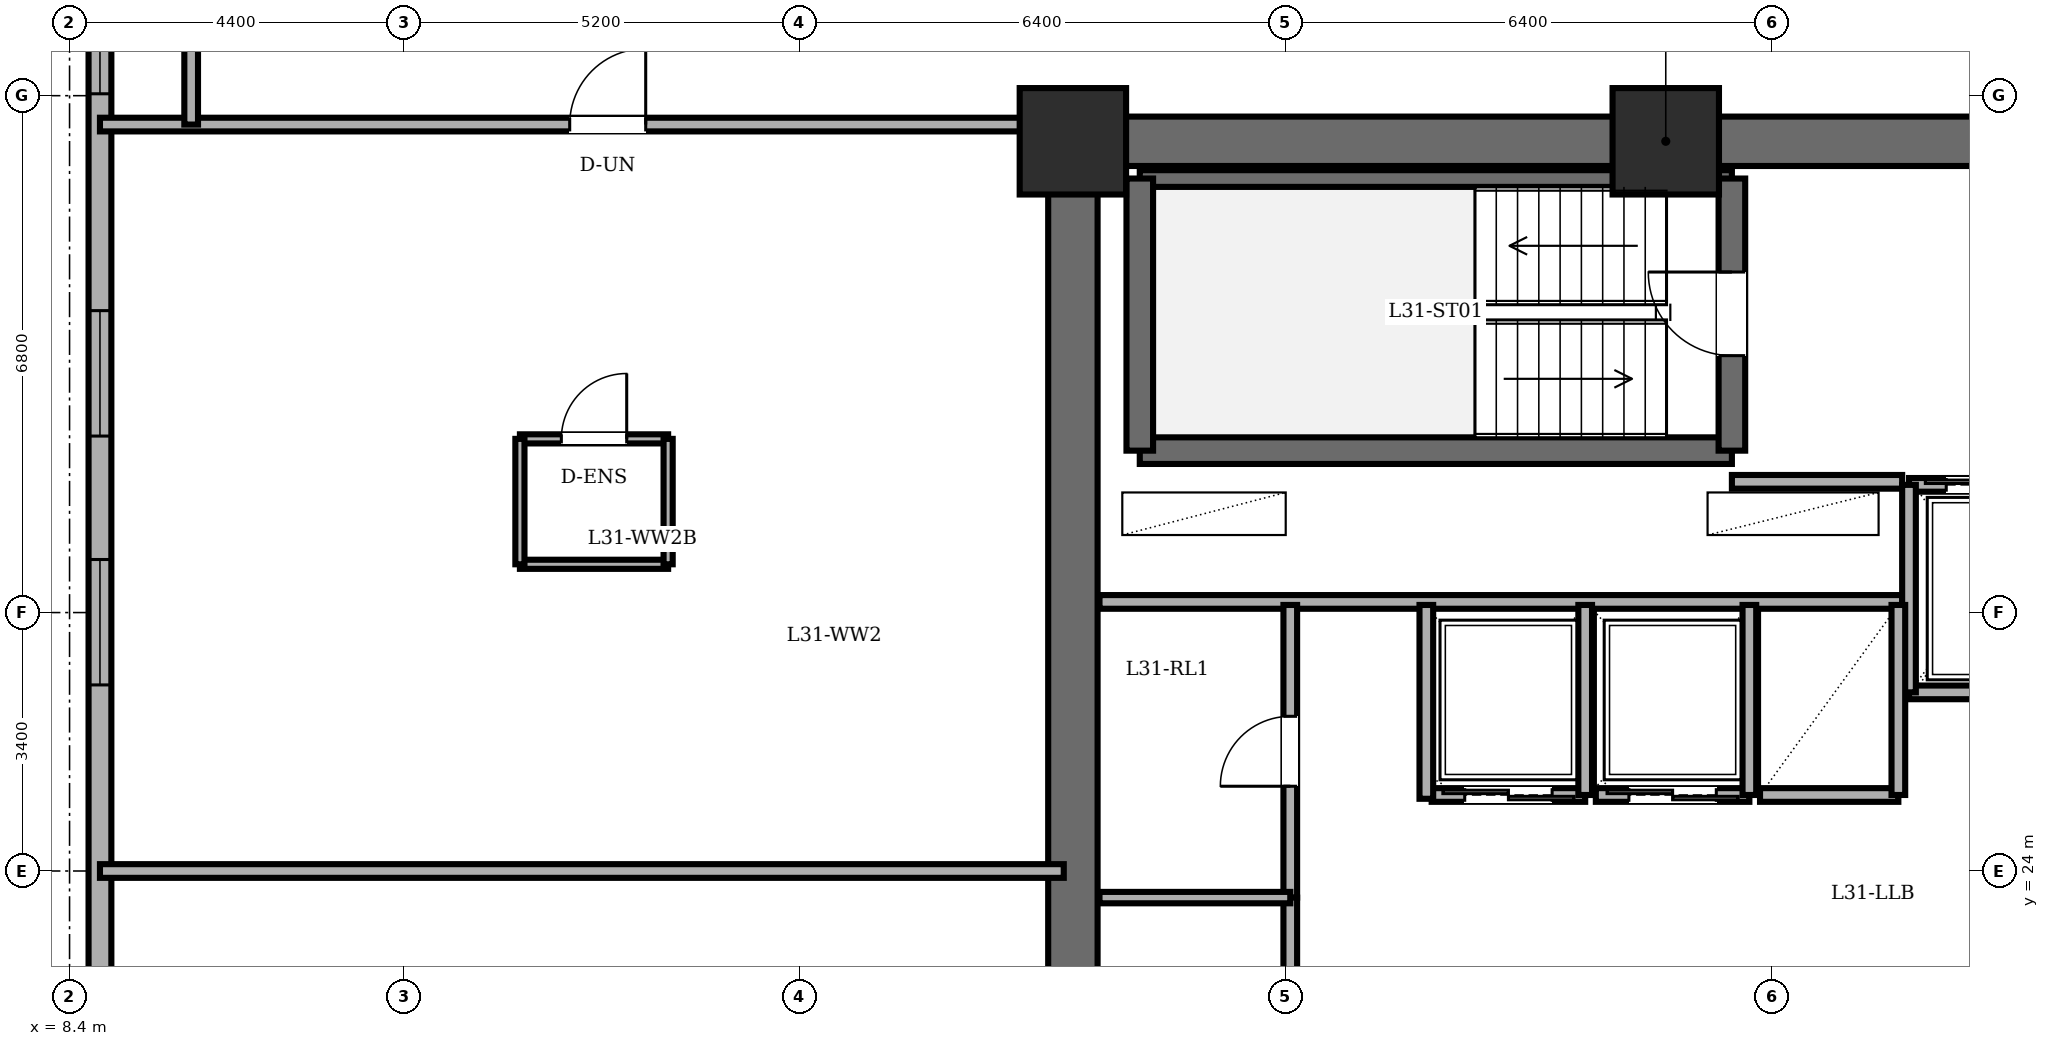
"""IFC4 building model, lengths in metres.
Left out: names, types, materials, properties, quantities, classifications, styles, units other than length and angle.
Written with IfcOpenShell. Run it as: python <this file> out.ifc"""

import sys

from ifc_helpers import new_model, si_unit, direction, frame, frame_2d, origin, origin_2d, place, context, subcontext, project, spatial, rectangle, extrude, element, fill, save


model = new_model("IFC4")
c1 = context("Model", 3, precision=1e-05, world=origin(), true_north=direction((0.0, 1.0)))
c2 = subcontext(c1, "Body", "Model", "MODEL_VIEW")
j1 = project(units=[si_unit("LENGTHUNIT", "METRE"), si_unit("PLANEANGLEUNIT", "RADIAN")], contexts=[c1])
p1 = place(None, origin())
s1 = spatial("IfcSite", under=j1, at=p1, CompositionType="ELEMENT")
p2 = place(p1, origin())
s2 = spatial("IfcBuilding", under=s1, at=p2, CompositionType="ELEMENT")
p3 = place(p2, frame((0.0, 0.0, 118.7)))
s3 = spatial("IfcBuildingStorey", under=s2, at=p3, CompositionType="ELEMENT", Elevation=118.7)
for number, where, z_axis, x_axis in (
    (1, (29.4, 33.6, 0.0), (0.0, 0.0, 1.0), (1.0, 0.0, 0.0)),
    (2, (21.6, 33.6, 0.0), (0.0, 0.0, 1.0), (1.0, 0.0, 0.0)),
):
    element("IfcColumn", number, at=place(p3, frame(where, z_axis=z_axis, x_axis=x_axis)), inside=s3, PredefinedType="COLUMN", context=c2, shape_type="SweptSolid", body=[
        extrude(rectangle(XDim=1.4, YDim=1.4, at=origin_2d()), origin(), (0.0, 0.0, 1.0), 3.6),
    ])
p4 = place(p3, frame((8.8, 38.2, 0.0), z_axis=(0.0, 0.0, 1.0), x_axis=(0.0, -1.0, 0.0)))
e3 = element("IfcWall", 3, at=p4, inside=s3, PredefinedType="SOLIDWALL", context=c2, shape_type="SweptSolid", body=[
    extrude(rectangle(XDim=28.4, YDim=0.3, at=frame_2d((14.2, 0.0))), origin(), (0.0, 0.0, 1.0), 3.4),
])
p5 = place(p4, frame((2.325, 0.0, 0.85)))
e4 = element("IfcOpeningElement", 4, at=p5, cuts=e3, PredefinedType="OPENING", context=c2, shape_type="SweptSolid", body=[
    extrude(rectangle(XDim=1.65, YDim=1.55, at=frame_2d((0.825, 0.775))), frame((0.0, 0.16, 0.0), z_axis=(0.0, -1.0, 0.0), x_axis=(1.0, 0.0, 0.0)), (0.0, 0.0, 1.0), 0.32),
])
p6 = place(p4, frame((6.828, 0.0, 0.85)))
e5 = element("IfcOpeningElement", 5, at=p6, cuts=e3, PredefinedType="OPENING", context=c2, shape_type="SweptSolid", body=[
    extrude(rectangle(XDim=1.65, YDim=1.55, at=frame_2d((0.825, 0.775))), frame((0.0, 0.16, 0.0), z_axis=(0.0, -1.0, 0.0), x_axis=(1.0, 0.0, 0.0)), (0.0, 0.0, 1.0), 0.32),
])
p7 = place(p4, frame((10.102, 0.0, 0.85)))
e6 = element("IfcOpeningElement", 6, at=p7, cuts=e3, PredefinedType="OPENING", context=c2, shape_type="SweptSolid", body=[
    extrude(rectangle(XDim=1.65, YDim=1.55, at=frame_2d((0.825, 0.775))), frame((0.0, 0.16, 0.0), z_axis=(0.0, -1.0, 0.0), x_axis=(1.0, 0.0, 0.0)), (0.0, 0.0, 1.0), 0.32),
])
p8 = place(p4, frame((16.648, 0.0, 0.85)))
e7 = element("IfcOpeningElement", 7, at=p8, cuts=e3, PredefinedType="OPENING", context=c2, shape_type="SweptSolid", body=[
    extrude(rectangle(XDim=1.65, YDim=1.55, at=frame_2d((0.825, 0.775))), frame((0.0, 0.16, 0.0), z_axis=(0.0, -1.0, 0.0), x_axis=(1.0, 0.0, 0.0)), (0.0, 0.0, 1.0), 0.32),
])
p9 = place(p4, frame((19.922, 0.0, 0.85)))
e8 = element("IfcOpeningElement", 8, at=p9, cuts=e3, PredefinedType="OPENING", context=c2, shape_type="SweptSolid", body=[
    extrude(rectangle(XDim=1.65, YDim=1.55, at=frame_2d((0.825, 0.775))), frame((0.0, 0.16, 0.0), z_axis=(0.0, -1.0, 0.0), x_axis=(1.0, 0.0, 0.0)), (0.0, 0.0, 1.0), 0.32),
])
p10 = place(p4, frame((24.425, 0.0, 0.85)))
e9 = element("IfcOpeningElement", 9, at=p10, cuts=e3, PredefinedType="OPENING", context=c2, shape_type="SweptSolid", body=[
    extrude(rectangle(XDim=1.65, YDim=1.55, at=frame_2d((0.825, 0.775))), frame((0.0, 0.16, 0.0), z_axis=(0.0, -1.0, 0.0), x_axis=(1.0, 0.0, 0.0)), (0.0, 0.0, 1.0), 0.32),
])
p11 = place(p3, frame((21.6, 14.4, 0.0), z_axis=(0.0, 0.0, 1.0), x_axis=(0.0, 1.0, 0.0)))
e10 = element("IfcWall", 10, at=p11, inside=s3, PredefinedType="SHEAR", context=c2, shape_type="SweptSolid", body=[
    extrude(rectangle(XDim=19.2, YDim=0.65, at=frame_2d((9.6, 0.0))), origin(), (0.0, 0.0, 1.0), 3.4),
])
p12 = place(p3, frame((21.6, 33.6, 0.0), z_axis=(0.0, 0.0, 1.0), x_axis=(1.0, 0.0, 0.0)))
e11 = element("IfcWall", 11, at=p12, inside=s3, PredefinedType="SHEAR", context=c2, shape_type="SweptSolid", body=[
    extrude(rectangle(XDim=15.6, YDim=0.65, at=frame_2d((7.8, 0.0))), origin(), (0.0, 0.0, 1.0), 3.4),
])
p13 = place(p3, frame((22.48, 29.53, 0.0), z_axis=(0.0, 0.0, 1.0), x_axis=(1.0, 0.0, 0.0)))
e12 = element("IfcWall", 12, at=p13, inside=s3, PredefinedType="SOLIDWALL", context=c2, shape_type="SweptSolid", body=[
    extrude(rectangle(XDim=7.79, YDim=0.35, at=frame_2d((3.895, 0.0))), origin(), (0.0, 0.0, 1.0), 3.4),
])
p14 = place(p3, frame((22.48, 33.11, 0.0), z_axis=(0.0, 0.0, 1.0), x_axis=(1.0, 0.0, 0.0)))
e13 = element("IfcWall", 13, at=p14, inside=s3, PredefinedType="PARTITIONING", context=c2, shape_type="SweptSolid", body=[
    extrude(rectangle(XDim=7.79, YDim=0.22, at=frame_2d((3.895, 0.0))), origin(), (0.0, 0.0, 1.0), 3.4),
])
p15 = place(p3, frame((22.48, 29.53, 0.0), z_axis=(0.0, 0.0, 1.0), x_axis=(0.0, 1.0, 0.0)))
e14 = element("IfcWall", 14, at=p15, inside=s3, PredefinedType="SOLIDWALL", context=c2, shape_type="SweptSolid", body=[
    extrude(rectangle(XDim=3.58, YDim=0.35, at=frame_2d((1.79, 0.0))), origin(), (0.0, 0.0, 1.0), 3.4),
])
p16 = place(p3, frame((30.27, 29.53, 0.0), z_axis=(0.0, 0.0, 1.0), x_axis=(0.0, 1.0, 0.0)))
e15 = element("IfcWall", 15, at=p16, inside=s3, PredefinedType="SOLIDWALL", context=c2, shape_type="SweptSolid", body=[
    extrude(rectangle(XDim=3.58, YDim=0.35, at=frame_2d((1.79, 0.0))), origin(), (0.0, 0.0, 1.0), 3.4),
])
p17 = place(p16, frame((1.25, 0.0, 0.0)))
e16 = element("IfcOpeningElement", 16, at=p17, cuts=e15, PredefinedType="OPENING", context=c2, shape_type="SweptSolid", body=[
    extrude(rectangle(XDim=1.1, YDim=2.15, at=frame_2d((0.55, 1.075))), frame((0.0, 0.185, 0.0), z_axis=(0.0, -1.0, 0.0), x_axis=(1.0, 0.0, 0.0)), (0.0, 0.0, 1.0), 0.37),
])
p18 = place(p3, frame((30.27, 29.12, 0.0), z_axis=(0.0, 0.0, 1.0), x_axis=(1.0, 0.0, 0.0)))
e17 = element("IfcWall", 17, at=p18, inside=s3, PredefinedType="PARTITIONING", context=c2, shape_type="SweptSolid", body=[
    extrude(rectangle(XDim=2.24, YDim=0.18, at=frame_2d((1.12, 0.0))), origin(), (0.0, 0.0, 1.0), 3.4),
])
p19 = place(p3, frame((21.95, 27.54, 0.0), z_axis=(0.0, 0.0, 1.0), x_axis=(1.0, 0.0, 0.0)))
e18 = element("IfcWall", 18, at=p19, inside=s3, PredefinedType="PARTITIONING", context=c2, shape_type="SweptSolid", body=[
    extrude(rectangle(XDim=10.56, YDim=0.18, at=frame_2d((5.28, 0.0))), origin(), (0.0, 0.0, 1.0), 3.4),
])
p20 = place(p3, frame((32.6, 29.08, 0.0), z_axis=(0.0, 0.0, 1.0), x_axis=(1.0, 0.0, 0.0)))
e19 = element("IfcWall", 19, at=p20, inside=s3, PredefinedType="PARTITIONING", context=c2, shape_type="SweptSolid", body=[
    extrude(rectangle(XDim=2.08, YDim=0.18, at=frame_2d((1.04, 0.0))), origin(), (0.0, 0.0, 1.0), 3.4),
])
p21 = place(p20, frame((0.49, 0.0, 0.0)))
e20 = element("IfcOpeningElement", 20, at=p21, cuts=e19, PredefinedType="OPENING", context=c2, shape_type="SweptSolid", body=[
    extrude(rectangle(XDim=1.1, YDim=2.2, at=frame_2d((0.55, 1.1))), frame((0.0, 0.1, 0.0), z_axis=(0.0, -1.0, 0.0), x_axis=(1.0, 0.0, 0.0)), (0.0, 0.0, 1.0), 0.2),
])
p22 = place(p3, frame((34.68, 26.35, 0.0), z_axis=(0.0, 0.0, 1.0), x_axis=(-1.0, 0.0, 0.0)))
e21 = element("IfcWall", 21, at=p22, inside=s3, PredefinedType="PARTITIONING", context=c2, shape_type="SweptSolid", body=[
    extrude(rectangle(XDim=2.08, YDim=0.18, at=frame_2d((1.04, 0.0))), origin(), (0.0, 0.0, 1.0), 3.4),
])
p23 = place(p3, frame((32.6, 29.08, 0.0), z_axis=(0.0, 0.0, 1.0), x_axis=(0.0, -1.0, 0.0)))
e22 = element("IfcWall", 22, at=p23, inside=s3, PredefinedType="PARTITIONING", context=c2, shape_type="SweptSolid", body=[
    extrude(rectangle(XDim=2.73, YDim=0.18, at=frame_2d((1.365, 0.0))), origin(), (0.0, 0.0, 1.0), 3.4),
])
p24 = place(p3, frame((28.34, 25.0, 0.0), z_axis=(0.0, 0.0, 1.0), x_axis=(-1.0, 0.0, 0.0)))
e23 = element("IfcWall", 23, at=p24, inside=s3, PredefinedType="PARTITIONING", context=c2, shape_type="SweptSolid", body=[
    extrude(rectangle(XDim=2.02, YDim=0.18, at=frame_2d((1.01, 0.0))), origin(), (0.0, 0.0, 1.0), 3.4),
])
p25 = place(p24, frame((0.435, 0.0, 0.0)))
e24 = element("IfcOpeningElement", 24, at=p25, cuts=e23, PredefinedType="OPENING", context=c2, shape_type="SweptSolid", body=[
    extrude(rectangle(XDim=1.15, YDim=2.2, at=frame_2d((0.575, 1.1))), frame((0.0, 0.1, 0.0), z_axis=(0.0, -1.0, 0.0), x_axis=(1.0, 0.0, 0.0)), (0.0, 0.0, 1.0), 0.2),
])
p26 = place(p3, frame((28.34, 25.0, 0.0), z_axis=(0.0, 0.0, 1.0), x_axis=(0.0, 1.0, 0.0)))
e25 = element("IfcWall", 25, at=p26, inside=s3, PredefinedType="PARTITIONING", context=c2, shape_type="SweptSolid", body=[
    extrude(rectangle(XDim=2.5, YDim=0.18, at=frame_2d((1.25, 0.0))), origin(), (0.0, 0.0, 1.0), 3.4),
])
p27 = place(p3, frame((30.5, 25.0, 0.0), z_axis=(0.0, 0.0, 1.0), x_axis=(-1.0, 0.0, 0.0)))
e26 = element("IfcWall", 26, at=p27, inside=s3, PredefinedType="PARTITIONING", context=c2, shape_type="SweptSolid", body=[
    extrude(rectangle(XDim=2.02, YDim=0.18, at=frame_2d((1.01, 0.0))), origin(), (0.0, 0.0, 1.0), 3.4),
])
p28 = place(p27, frame((0.435, 0.0, 0.0)))
e27 = element("IfcOpeningElement", 27, at=p28, cuts=e26, PredefinedType="OPENING", context=c2, shape_type="SweptSolid", body=[
    extrude(rectangle(XDim=1.15, YDim=2.2, at=frame_2d((0.575, 1.1))), frame((0.0, 0.1, 0.0), z_axis=(0.0, -1.0, 0.0), x_axis=(1.0, 0.0, 0.0)), (0.0, 0.0, 1.0), 0.2),
])
p29 = place(p3, frame((30.5, 25.0, 0.0), z_axis=(0.0, 0.0, 1.0), x_axis=(0.0, 1.0, 0.0)))
e28 = element("IfcWall", 28, at=p29, inside=s3, PredefinedType="PARTITIONING", context=c2, shape_type="SweptSolid", body=[
    extrude(rectangle(XDim=2.5, YDim=0.18, at=frame_2d((1.25, 0.0))), origin(), (0.0, 0.0, 1.0), 3.4),
])
p30 = place(p3, frame((32.46, 25.0, 0.0), z_axis=(0.0, 0.0, 1.0), x_axis=(-1.0, 0.0, 0.0)))
e29 = element("IfcWall", 29, at=p30, inside=s3, PredefinedType="PARTITIONING", context=c2, shape_type="SweptSolid", body=[
    extrude(rectangle(XDim=1.82, YDim=0.18, at=frame_2d((0.91, 0.0))), origin(), (0.0, 0.0, 1.0), 3.4),
])
p31 = place(p3, frame((32.46, 25.0, 0.0), z_axis=(0.0, 0.0, 1.0), x_axis=(0.0, 1.0, 0.0)))
e30 = element("IfcWall", 30, at=p31, inside=s3, PredefinedType="PARTITIONING", context=c2, shape_type="SweptSolid", body=[
    extrude(rectangle(XDim=2.5, YDim=0.18, at=frame_2d((1.25, 0.0))), origin(), (0.0, 0.0, 1.0), 3.4),
])
p32 = place(p3, frame((24.46, 23.65, 0.0), z_axis=(0.0, 0.0, 1.0), x_axis=(0.0, 1.0, 0.0)))
e31 = element("IfcWall", 31, at=p32, inside=s3, PredefinedType="PARTITIONING", context=c2, shape_type="SweptSolid", body=[
    extrude(rectangle(XDim=3.85, YDim=0.18, at=frame_2d((1.925, 0.0))), origin(), (0.0, 0.0, 1.0), 3.4),
])
p33 = place(p32, frame((1.465, 0.0, 0.0)))
e32 = element("IfcOpeningElement", 32, at=p33, cuts=e31, PredefinedType="OPENING", context=c2, shape_type="SweptSolid", body=[
    extrude(rectangle(XDim=0.92, YDim=2.1, at=frame_2d((0.46, 1.05))), frame((0.0, 0.1, 0.0), z_axis=(0.0, -1.0, 0.0), x_axis=(1.0, 0.0, 0.0)), (0.0, 0.0, 1.0), 0.2),
])
p34 = place(p3, frame((24.46, 19.8, 0.0), z_axis=(0.0, 0.0, 1.0), x_axis=(0.0, 1.0, 0.0)))
e33 = element("IfcWall", 33, at=p34, inside=s3, PredefinedType="PARTITIONING", context=c2, shape_type="SweptSolid", body=[
    extrude(rectangle(XDim=3.85, YDim=0.18, at=frame_2d((1.925, 0.0))), origin(), (0.0, 0.0, 1.0), 3.4),
])
p35 = place(p34, frame((1.465, 0.0, 0.0)))
e34 = element("IfcOpeningElement", 34, at=p35, cuts=e33, PredefinedType="OPENING", context=c2, shape_type="SweptSolid", body=[
    extrude(rectangle(XDim=0.92, YDim=2.1, at=frame_2d((0.46, 1.05))), frame((0.0, 0.1, 0.0), z_axis=(0.0, -1.0, 0.0), x_axis=(1.0, 0.0, 0.0)), (0.0, 0.0, 1.0), 0.2),
])
p36 = place(p3, frame((21.95, 23.65, 0.0), z_axis=(0.0, 0.0, 1.0), x_axis=(1.0, 0.0, 0.0)))
e35 = element("IfcWall", 35, at=p36, inside=s3, PredefinedType="PARTITIONING", context=c2, shape_type="SweptSolid", body=[
    extrude(rectangle(XDim=2.51, YDim=0.15, at=frame_2d((1.255, 0.0))), origin(), (0.0, 0.0, 1.0), 3.4),
])
p37 = place(p3, frame((26.25, 24.95, 0.0), z_axis=(0.0, 0.0, 1.0), x_axis=(0.0, 1.0, 0.0)))
e36 = element("IfcWall", 36, at=p37, inside=s3, PredefinedType="PARTITIONING", context=c2, shape_type="SweptSolid", body=[
    extrude(rectangle(XDim=2.55, YDim=0.18, at=frame_2d((1.275, 0.0))), origin(), (0.0, 0.0, 1.0), 3.4),
])
p38 = place(p3, frame((14.325, 29.685, 0.0), z_axis=(0.0, 0.0, 1.0), x_axis=(1.0, 0.0, 0.0)))
e37 = element("IfcWall", 37, at=p38, inside=s3, PredefinedType="PARTITIONING", context=c2, shape_type="SweptSolid", body=[
    extrude(rectangle(XDim=1.95, YDim=0.12, at=frame_2d((0.975, 0.0))), origin(), (0.0, 0.0, 1.0), 3.4),
])
p39 = place(p38, frame((0.545, 0.0, 0.0)))
e38 = element("IfcOpeningElement", 38, at=p39, cuts=e37, PredefinedType="OPENING", context=c2, shape_type="SweptSolid", body=[
    extrude(rectangle(XDim=0.86, YDim=2.1, at=frame_2d((0.43, 1.05))), frame((0.0, 0.07, 0.0), z_axis=(0.0, -1.0, 0.0), x_axis=(1.0, 0.0, 0.0)), (0.0, 0.0, 1.0), 0.14),
])
p40 = place(p3, frame((16.275, 28.035, 0.0), z_axis=(0.0, 0.0, 1.0), x_axis=(-1.0, 0.0, 0.0)))
e39 = element("IfcWall", 39, at=p40, inside=s3, PredefinedType="PARTITIONING", context=c2, shape_type="SweptSolid", body=[
    extrude(rectangle(XDim=1.95, YDim=0.12, at=frame_2d((0.975, 0.0))), origin(), (0.0, 0.0, 1.0), 3.4),
])
for number, where, z_axis, x_axis in (
    (40, (14.325, 29.685, 0.0), (0.0, 0.0, 1.0), (0.0, -1.0, 0.0)),
    (41, (16.275, 28.035, 0.0), (0.0, 0.0, 1.0), (0.0, 1.0, 0.0)),
):
    element("IfcWall", number, at=place(p3, frame(where, z_axis=z_axis, x_axis=x_axis)), inside=s3, PredefinedType="PARTITIONING", context=c2, shape_type="SweptSolid", body=[
        extrude(rectangle(XDim=1.65, YDim=0.12, at=frame_2d((0.825, 0.0))), origin(), (0.0, 0.0, 1.0), 3.4),
    ])
p41 = place(p3, frame((8.8, 24.0, 0.0), z_axis=(0.0, 0.0, 1.0), x_axis=(1.0, 0.0, 0.0)))
e42 = element("IfcWall", 42, at=p41, inside=s3, PredefinedType="PARTITIONING", context=c2, shape_type="SweptSolid", body=[
    extrude(rectangle(XDim=12.68, YDim=0.18, at=frame_2d((6.34, 0.0))), origin(), (0.0, 0.0, 1.0), 3.4),
])
p42 = place(p3, frame((8.8, 33.82, 0.0), z_axis=(0.0, 0.0, 1.0), x_axis=(1.0, 0.0, 0.0)))
e43 = element("IfcWall", 43, at=p42, inside=s3, PredefinedType="PARTITIONING", context=c2, shape_type="SweptSolid", body=[
    extrude(rectangle(XDim=12.68, YDim=0.18, at=frame_2d((6.34, 0.0))), origin(), (0.0, 0.0, 1.0), 3.4),
])
p43 = place(p42, frame((6.18, 0.0, 0.0)))
e44 = element("IfcOpeningElement", 44, at=p43, cuts=e43, PredefinedType="OPENING", context=c2, shape_type="SweptSolid", body=[
    extrude(rectangle(XDim=1.0, YDim=2.15, at=frame_2d((0.5, 1.075))), frame((0.0, 0.1, 0.0), z_axis=(0.0, -1.0, 0.0), x_axis=(1.0, 0.0, 0.0)), (0.0, 0.0, 1.0), 0.2),
])
p44 = place(p3, frame((10.0, 33.82, 0.0), z_axis=(0.0, 0.0, 1.0), x_axis=(0.0, 1.0, 0.0)))
e45 = element("IfcWall", 45, at=p44, inside=s3, PredefinedType="PARTITIONING", context=c2, shape_type="SweptSolid", body=[
    extrude(rectangle(XDim=2.46, YDim=0.18, at=frame_2d((1.23, 0.0))), origin(), (0.0, 0.0, 1.0), 3.4),
])
p45 = place(p5, origin())
e46 = element("IfcWindow", 46, at=p45, inside=s3, PartitioningType="DOUBLE_PANEL_VERTICAL", PredefinedType="WINDOW", context=c2, shape_type="SweptSolid", body=[
    extrude(rectangle(XDim=1.65, YDim=1.55, at=frame_2d((0.825, 0.775))), frame((0.0, 0.03, 0.0), z_axis=(0.0, -1.0, 0.0), x_axis=(1.0, 0.0, 0.0)), (0.0, 0.0, 1.0), 0.06),
])
fill(e4, e46)
p46 = place(p6, origin())
e47 = element("IfcWindow", 47, at=p46, inside=s3, PartitioningType="DOUBLE_PANEL_VERTICAL", PredefinedType="WINDOW", context=c2, shape_type="SweptSolid", body=[
    extrude(rectangle(XDim=1.65, YDim=1.55, at=frame_2d((0.825, 0.775))), frame((0.0, 0.03, 0.0), z_axis=(0.0, -1.0, 0.0), x_axis=(1.0, 0.0, 0.0)), (0.0, 0.0, 1.0), 0.06),
])
fill(e5, e47)
p47 = place(p7, origin())
e48 = element("IfcWindow", 48, at=p47, inside=s3, PartitioningType="DOUBLE_PANEL_VERTICAL", PredefinedType="WINDOW", context=c2, shape_type="SweptSolid", body=[
    extrude(rectangle(XDim=1.65, YDim=1.55, at=frame_2d((0.825, 0.775))), frame((0.0, 0.03, 0.0), z_axis=(0.0, -1.0, 0.0), x_axis=(1.0, 0.0, 0.0)), (0.0, 0.0, 1.0), 0.06),
])
fill(e6, e48)
p48 = place(p17, origin())
e49 = element("IfcDoor", 49, at=p48, inside=s3, OperationType="SINGLE_SWING_RIGHT", PredefinedType="DOOR", context=c2, shape_type="SweptSolid", body=[
    extrude(rectangle(XDim=1.1, YDim=2.15, at=frame_2d((0.55, 1.075))), frame((0.0, 0.025, 0.0), z_axis=(0.0, -1.0, 0.0), x_axis=(1.0, 0.0, 0.0)), (0.0, 0.0, 1.0), 0.05),
])
fill(e16, e49)
p49 = place(p21, origin())
e50 = element("IfcDoor", 50, at=p49, inside=s3, OperationType="DOUBLE_DOOR_SLIDING", PredefinedType="DOOR", context=c2, shape_type="SweptSolid", body=[
    extrude(rectangle(XDim=1.1, YDim=2.2, at=frame_2d((0.55, 1.1))), frame((0.0, 0.025, 0.0), z_axis=(0.0, -1.0, 0.0), x_axis=(1.0, 0.0, 0.0)), (0.0, 0.0, 1.0), 0.05),
])
fill(e20, e50)
p50 = place(p25, origin())
e51 = element("IfcDoor", 51, at=p50, inside=s3, OperationType="DOUBLE_DOOR_SLIDING", PredefinedType="DOOR", context=c2, shape_type="SweptSolid", body=[
    extrude(rectangle(XDim=1.15, YDim=2.2, at=frame_2d((0.575, 1.1))), frame((0.0, 0.025, 0.0), z_axis=(0.0, -1.0, 0.0), x_axis=(1.0, 0.0, 0.0)), (0.0, 0.0, 1.0), 0.05),
])
fill(e24, e51)
p51 = place(p28, origin())
e52 = element("IfcDoor", 52, at=p51, inside=s3, OperationType="DOUBLE_DOOR_SLIDING", PredefinedType="DOOR", context=c2, shape_type="SweptSolid", body=[
    extrude(rectangle(XDim=1.15, YDim=2.2, at=frame_2d((0.575, 1.1))), frame((0.0, 0.025, 0.0), z_axis=(0.0, -1.0, 0.0), x_axis=(1.0, 0.0, 0.0)), (0.0, 0.0, 1.0), 0.05),
])
fill(e27, e52)
p52 = place(p33, origin())
e53 = element("IfcDoor", 53, at=p52, inside=s3, OperationType="SINGLE_SWING_LEFT", PredefinedType="DOOR", context=c2, shape_type="SweptSolid", body=[
    extrude(rectangle(XDim=0.92, YDim=2.1, at=frame_2d((0.46, 1.05))), frame((0.0, 0.025, 0.0), z_axis=(0.0, -1.0, 0.0), x_axis=(1.0, 0.0, 0.0)), (0.0, 0.0, 1.0), 0.05),
])
fill(e32, e53)
p53 = place(p39, origin())
e54 = element("IfcDoor", 54, at=p53, inside=s3, OperationType="SINGLE_SWING_RIGHT", PredefinedType="DOOR", context=c2, shape_type="SweptSolid", body=[
    extrude(rectangle(XDim=0.86, YDim=2.1, at=frame_2d((0.43, 1.05))), frame((0.0, 0.025, 0.0), z_axis=(0.0, -1.0, 0.0), x_axis=(1.0, 0.0, 0.0)), (0.0, 0.0, 1.0), 0.05),
])
fill(e38, e54)
p54 = place(p43, origin())
e55 = element("IfcDoor", 55, at=p54, inside=s3, OperationType="SINGLE_SWING_RIGHT", PredefinedType="DOOR", context=c2, shape_type="SweptSolid", body=[
    extrude(rectangle(XDim=1.0, YDim=2.15, at=frame_2d((0.5, 1.075))), frame((0.0, 0.025, 0.0), z_axis=(0.0, -1.0, 0.0), x_axis=(1.0, 0.0, 0.0)), (0.0, 0.0, 1.0), 0.05),
])
fill(e44, e55)
save(model, sys.argv[1])
